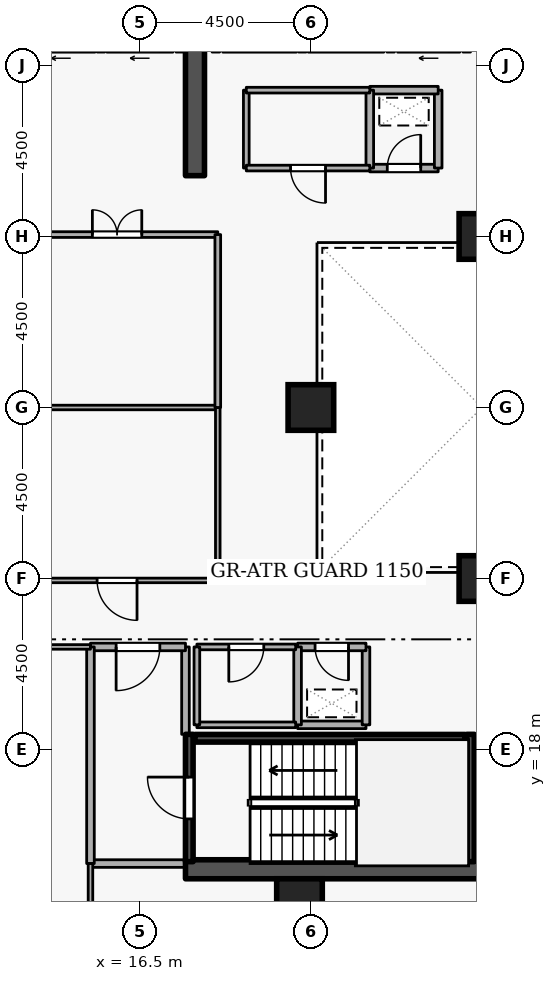
"""IFC4 building model, lengths in metres.
Left out: names, types, materials, properties, quantities, classifications, styles, units other than length and angle.
Written with IfcOpenShell. Run it as: python <this file> out.ifc"""

import sys

from ifc_helpers import new_model, si_unit, direction, frame, frame_2d, origin, origin_2d, place, context, subcontext, project, spatial, rectangle, extrude, element, fill, save


model = new_model("IFC4")
c1 = context("Model", 3, precision=1e-05, world=origin(), true_north=direction((0.0, 1.0)))
c2 = subcontext(c1, "Body", "Model", "MODEL_VIEW")
j1 = project(units=[si_unit("LENGTHUNIT", "METRE"), si_unit("PLANEANGLEUNIT", "RADIAN")], contexts=[c1])
p1 = place(None, origin())
s1 = spatial("IfcSite", under=j1, at=p1, CompositionType="ELEMENT")
p2 = place(p1, origin())
s2 = spatial("IfcBuilding", under=s1, at=p2, CompositionType="ELEMENT")
p3 = place(p2, frame((0.0, 0.0, 123.3)))
s3 = spatial("IfcBuildingStorey", under=s2, at=p3, CompositionType="ELEMENT", Elevation=123.3)
p4 = place(p3, frame((17.7, 14.85, 0.0), z_axis=(0.0, 0.0, 1.0), x_axis=(1.0, 0.0, 0.0)))
e1 = element("IfcWall", 1, at=p4, inside=s3, PredefinedType="SHEAR", context=c2, shape_type="SweptSolid", body=[
    extrude(rectangle(XDim=15.6, YDim=0.5, at=frame_2d((7.8, 0.0))), origin(), (0.0, 0.0, 1.0), 3.6),
])
p5 = place(p3, frame((17.95, 33.1, 0.0), z_axis=(0.0, 0.0, 1.0), x_axis=(0.0, 1.0, 0.0)))
e2 = element("IfcWall", 2, at=p5, inside=s3, PredefinedType="SHEAR", context=c2, shape_type="SweptSolid", body=[
    extrude(rectangle(XDim=5.8, YDim=0.5, at=frame_2d((2.9, 0.0))), origin(), (0.0, 0.0, 1.0), 3.6),
])
for number, where, z_axis, x_axis in (
    (3, (20.7, 14.0, 0.0), (0.0, 0.0, 1.0), (1.0, 0.0, 0.0)),
    (4, (25.5, 22.5, 0.0), (0.0, 0.0, 1.0), (1.0, 0.0, 0.0)),
    (5, (25.5, 31.5, 0.0), (0.0, 0.0, 1.0), (1.0, 0.0, 0.0)),
    (6, (21.0, 27.0, 0.0), (0.0, 0.0, 1.0), (1.0, 0.0, 0.0)),
):
    element("IfcColumn", number, at=place(p3, frame(where, z_axis=z_axis, x_axis=x_axis)), inside=s3, PredefinedType="COLUMN", context=c2, shape_type="SweptSolid", body=[
        extrude(rectangle(XDim=1.2, YDim=1.2, at=origin_2d()), origin(), (0.0, 0.0, 1.0), 3.6),
    ])
p6 = place(p3, frame((24.92, 36.45, 0.0), z_axis=(0.0, 0.0, 1.0), x_axis=(-1.0, 0.0, 0.0)))
e7 = element("IfcWall", 7, at=p6, inside=s3, PredefinedType="STANDARD", context=c2, shape_type="SweptSolid", body=[
    extrude(rectangle(XDim=1.64, YDim=0.2, at=frame_2d((0.82, 0.0))), origin(), (0.0, 0.0, 1.0), 3.34),
])
p7 = place(p6, frame((0.31, 0.0, 0.0)))
e8 = element("IfcOpeningElement", 8, at=p7, cuts=e7, PredefinedType="OPENING", context=c2, shape_type="SweptSolid", body=[
    extrude(rectangle(XDim=1.02, YDim=2.06, at=frame_2d((0.51, 1.03))), frame((0.0, 0.11, 0.0), z_axis=(0.0, -1.0, 0.0), x_axis=(1.0, 0.0, 0.0)), (0.0, 0.0, 1.0), 0.22),
])
p8 = place(p3, frame((22.92, 36.45, 0.0), z_axis=(0.0, 0.0, 1.0), x_axis=(-1.0, 0.0, 0.0)))
e9 = element("IfcWall", 9, at=p8, inside=s3, PredefinedType="STANDARD", context=c2, shape_type="SweptSolid", body=[
    extrude(rectangle(XDim=1.99, YDim=0.2, at=frame_2d((0.995, 0.0))), origin(), (0.0, 0.0, 1.0), 3.34),
])
p9 = place(p3, frame((20.62, 36.45, 0.0), z_axis=(0.0, 0.0, 1.0), x_axis=(-1.0, 0.0, 0.0)))
e10 = element("IfcWall", 10, at=p9, inside=s3, PredefinedType="STANDARD", context=c2, shape_type="SweptSolid", body=[
    extrude(rectangle(XDim=1.94, YDim=0.2, at=frame_2d((0.97, 0.0))), origin(), (0.0, 0.0, 1.0), 3.34),
])
p10 = place(p3, frame((17.37, 36.45, 0.0), z_axis=(0.0, 0.0, 1.0), x_axis=(-1.0, 0.0, 0.0)))
e11 = element("IfcWall", 11, at=p10, inside=s3, PredefinedType="STANDARD", context=c2, shape_type="SweptSolid", body=[
    extrude(rectangle(XDim=1.74, YDim=0.2, at=frame_2d((0.87, 0.0))), origin(), (0.0, 0.0, 1.0), 3.34),
])
p11 = place(p10, frame((0.36, 0.0, 0.0)))
e12 = element("IfcOpeningElement", 12, at=p11, cuts=e11, PredefinedType="OPENING", context=c2, shape_type="SweptSolid", body=[
    extrude(rectangle(XDim=1.02, YDim=2.06, at=frame_2d((0.51, 1.03))), frame((0.0, 0.11, 0.0), z_axis=(0.0, -1.0, 0.0), x_axis=(1.0, 0.0, 0.0)), (0.0, 0.0, 1.0), 0.22),
])
p12 = place(p3, frame((15.32, 36.45, 0.0), z_axis=(0.0, 0.0, 1.0), x_axis=(-1.0, 0.0, 0.0)))
e13 = element("IfcWall", 13, at=p12, inside=s3, PredefinedType="STANDARD", context=c2, shape_type="SweptSolid", body=[
    extrude(rectangle(XDim=1.79, YDim=0.2, at=frame_2d((0.895, 0.0))), origin(), (0.0, 0.0, 1.0), 3.34),
])
p13 = place(p12, frame((0.385, 0.0, 0.0)))
e14 = element("IfcOpeningElement", 14, at=p13, cuts=e13, PredefinedType="OPENING", context=c2, shape_type="SweptSolid", body=[
    extrude(rectangle(XDim=1.02, YDim=2.06, at=frame_2d((0.51, 1.03))), frame((0.0, 0.11, 0.0), z_axis=(0.0, -1.0, 0.0), x_axis=(1.0, 0.0, 0.0)), (0.0, 0.0, 1.0), 0.22),
])
p14 = place(p3, frame((17.8, 15.05, 0.0), z_axis=(0.0, 0.0, 1.0), x_axis=(0.0, 1.0, 0.0)))
e15 = element("IfcWall", 15, at=p14, inside=s3, PredefinedType="SHEAR", context=c2, shape_type="SweptSolid", body=[
    extrude(rectangle(XDim=3.35, YDim=0.2, at=frame_2d((1.675, 0.0))), origin(), (0.0, 0.0, 1.0), 3.6),
])
p15 = place(p14, frame((1.125, 0.0, 0.0)))
e16 = element("IfcOpeningElement", 16, at=p15, cuts=e15, PredefinedType="OPENING", context=c2, shape_type="SweptSolid", body=[
    extrude(rectangle(XDim=1.1, YDim=2.1, at=frame_2d((0.55, 1.05))), frame((0.0, 0.11, 0.0), z_axis=(0.0, -1.0, 0.0), x_axis=(1.0, 0.0, 0.0)), (0.0, 0.0, 1.0), 0.22),
])
p16 = place(p3, frame((25.2, 18.4, 0.0), z_axis=(0.0, 0.0, 1.0), x_axis=(0.0, -1.0, 0.0)))
e17 = element("IfcWall", 17, at=p16, inside=s3, PredefinedType="SHEAR", context=c2, shape_type="SweptSolid", body=[
    extrude(rectangle(XDim=3.35, YDim=0.2, at=frame_2d((1.675, 0.0))), origin(), (0.0, 0.0, 1.0), 3.6),
])
p17 = place(p3, frame((25.05, 18.297, 0.0), z_axis=(0.0, 0.0, 1.0), x_axis=(-1.0, 0.0, 0.0)))
e18 = element("IfcWall", 18, at=p17, inside=s3, PredefinedType="SHEAR", context=c2, shape_type="SweptSolid", body=[
    extrude(rectangle(XDim=7.1, YDim=0.2, at=frame_2d((3.55, 0.0))), origin(), (0.0, 0.0, 1.0), 3.6),
])
p18 = place(p3, frame((15.2, 15.0, 0.0), z_axis=(0.0, 0.0, 1.0), x_axis=(1.0, 0.0, 0.0)))
e19 = element("IfcWall", 19, at=p18, inside=s3, PredefinedType="STANDARD", context=c2, shape_type="SweptSolid", body=[
    extrude(rectangle(XDim=2.5, YDim=0.2, at=frame_2d((1.25, 0.0))), origin(), (0.0, 0.0, 1.0), 3.34),
])
p19 = place(p3, frame((17.7, 18.4, 0.0), z_axis=(0.0, 0.0, 1.0), x_axis=(0.0, 1.0, 0.0)))
e20 = element("IfcWall", 20, at=p19, inside=s3, PredefinedType="STANDARD", context=c2, shape_type="SweptSolid", body=[
    extrude(rectangle(XDim=2.3, YDim=0.2, at=frame_2d((1.15, 0.0))), origin(), (0.0, 0.0, 1.0), 2.545),
])
p20 = place(p3, frame((17.7, 20.7, 0.0), z_axis=(0.0, 0.0, 1.0), x_axis=(-1.0, 0.0, 0.0)))
e21 = element("IfcWall", 21, at=p20, inside=s3, PredefinedType="STANDARD", context=c2, shape_type="SweptSolid", body=[
    extrude(rectangle(XDim=2.5, YDim=0.2, at=frame_2d((1.25, 0.0))), origin(), (0.0, 0.0, 1.0), 3.34),
])
p21 = place(p20, frame((0.675, 0.0, 0.0)))
e22 = element("IfcOpeningElement", 22, at=p21, cuts=e21, PredefinedType="OPENING", context=c2, shape_type="SweptSolid", body=[
    extrude(rectangle(XDim=1.15, YDim=2.1, at=frame_2d((0.575, 1.05))), frame((0.0, 0.11, 0.0), z_axis=(0.0, -1.0, 0.0), x_axis=(1.0, 0.0, 0.0)), (0.0, 0.0, 1.0), 0.22),
])
p22 = place(p3, frame((15.2, 20.7, 0.0), z_axis=(0.0, 0.0, 1.0), x_axis=(0.0, -1.0, 0.0)))
e23 = element("IfcWall", 23, at=p22, inside=s3, PredefinedType="STANDARD", context=c2, shape_type="SweptSolid", body=[
    extrude(rectangle(XDim=5.7, YDim=0.2, at=frame_2d((2.85, 0.0))), origin(), (0.0, 0.0, 1.0), 3.34),
])
p23 = place(p3, frame((20.65, 18.65, 0.0), z_axis=(0.0, 0.0, 1.0), x_axis=(1.0, 0.0, 0.0)))
e24 = element("IfcWall", 24, at=p23, inside=s3, PredefinedType="STANDARD", context=c2, shape_type="SweptSolid", body=[
    extrude(rectangle(XDim=1.8, YDim=0.2, at=frame_2d((0.9, 0.0))), origin(), (0.0, 0.0, 1.0), 3.34),
])
p24 = place(p3, frame((22.45, 18.65, 0.0), z_axis=(0.0, 0.0, 1.0), x_axis=(0.0, 1.0, 0.0)))
e25 = element("IfcWall", 25, at=p24, inside=s3, PredefinedType="STANDARD", context=c2, shape_type="SweptSolid", body=[
    extrude(rectangle(XDim=2.05, YDim=0.2, at=frame_2d((1.025, 0.0))), origin(), (0.0, 0.0, 1.0), 3.34),
])
p25 = place(p3, frame((22.45, 20.7, 0.0), z_axis=(0.0, 0.0, 1.0), x_axis=(-1.0, 0.0, 0.0)))
e26 = element("IfcWall", 26, at=p25, inside=s3, PredefinedType="STANDARD", context=c2, shape_type="SweptSolid", body=[
    extrude(rectangle(XDim=1.8, YDim=0.2, at=frame_2d((0.9, 0.0))), origin(), (0.0, 0.0, 1.0), 3.34),
])
p26 = place(p25, frame((0.46, 0.0, 0.0)))
e27 = element("IfcOpeningElement", 27, at=p26, cuts=e26, PredefinedType="OPENING", context=c2, shape_type="SweptSolid", body=[
    extrude(rectangle(XDim=0.88, YDim=2.04, at=frame_2d((0.44, 1.02))), frame((0.0, 0.11, 0.0), z_axis=(0.0, -1.0, 0.0), x_axis=(1.0, 0.0, 0.0)), (0.0, 0.0, 1.0), 0.22),
])
p27 = place(p3, frame((20.65, 20.7, 0.0), z_axis=(0.0, 0.0, 1.0), x_axis=(0.0, -1.0, 0.0)))
e28 = element("IfcWall", 28, at=p27, inside=s3, PredefinedType="STANDARD", context=c2, shape_type="SweptSolid", body=[
    extrude(rectangle(XDim=2.05, YDim=0.2, at=frame_2d((1.025, 0.0))), origin(), (0.0, 0.0, 1.0), 3.34),
])
p28 = place(p3, frame((22.55, 33.3, 0.0), z_axis=(0.0, 0.0, 1.0), x_axis=(1.0, 0.0, 0.0)))
e29 = element("IfcWall", 29, at=p28, inside=s3, PredefinedType="STANDARD", context=c2, shape_type="SweptSolid", body=[
    extrude(rectangle(XDim=1.8, YDim=0.2, at=frame_2d((0.9, 0.0))), origin(), (0.0, 0.0, 1.0), 3.34),
])
p29 = place(p28, frame((0.46, 0.0, 0.0)))
e30 = element("IfcOpeningElement", 30, at=p29, cuts=e29, PredefinedType="OPENING", context=c2, shape_type="SweptSolid", body=[
    extrude(rectangle(XDim=0.88, YDim=2.04, at=frame_2d((0.44, 1.02))), frame((0.0, 0.11, 0.0), z_axis=(0.0, -1.0, 0.0), x_axis=(1.0, 0.0, 0.0)), (0.0, 0.0, 1.0), 0.22),
])
p30 = place(p3, frame((24.35, 33.3, 0.0), z_axis=(0.0, 0.0, 1.0), x_axis=(0.0, 1.0, 0.0)))
e31 = element("IfcWall", 31, at=p30, inside=s3, PredefinedType="STANDARD", context=c2, shape_type="SweptSolid", body=[
    extrude(rectangle(XDim=2.05, YDim=0.2, at=frame_2d((1.025, 0.0))), origin(), (0.0, 0.0, 1.0), 3.34),
])
p31 = place(p3, frame((24.35, 35.35, 0.0), z_axis=(0.0, 0.0, 1.0), x_axis=(-1.0, 0.0, 0.0)))
e32 = element("IfcWall", 32, at=p31, inside=s3, PredefinedType="STANDARD", context=c2, shape_type="SweptSolid", body=[
    extrude(rectangle(XDim=1.8, YDim=0.2, at=frame_2d((0.9, 0.0))), origin(), (0.0, 0.0, 1.0), 3.34),
])
p32 = place(p3, frame((22.55, 35.35, 0.0), z_axis=(0.0, 0.0, 1.0), x_axis=(0.0, -1.0, 0.0)))
e33 = element("IfcWall", 33, at=p32, inside=s3, PredefinedType="STANDARD", context=c2, shape_type="SweptSolid", body=[
    extrude(rectangle(XDim=2.05, YDim=0.2, at=frame_2d((1.025, 0.0))), origin(), (0.0, 0.0, 1.0), 3.34),
])
p33 = place(p3, frame((18.0, 18.65, 0.0), z_axis=(0.0, 0.0, 1.0), x_axis=(1.0, 0.0, 0.0)))
e34 = element("IfcWall", 34, at=p33, inside=s3, PredefinedType="PARTITIONING", context=c2, shape_type="SweptSolid", body=[
    extrude(rectangle(XDim=2.6, YDim=0.15, at=frame_2d((1.3, 0.0))), origin(), (0.0, 0.0, 1.0), 3.34),
])
p34 = place(p3, frame((20.6, 20.7, 0.0), z_axis=(0.0, 0.0, 1.0), x_axis=(-1.0, 0.0, 0.0)))
e35 = element("IfcWall", 35, at=p34, inside=s3, PredefinedType="PARTITIONING", context=c2, shape_type="SweptSolid", body=[
    extrude(rectangle(XDim=2.6, YDim=0.15, at=frame_2d((1.3, 0.0))), origin(), (0.0, 0.0, 1.0), 3.34),
])
p35 = place(p34, frame((0.84, 0.0, 0.0)))
e36 = element("IfcOpeningElement", 36, at=p35, cuts=e35, PredefinedType="OPENING", context=c2, shape_type="SweptSolid", body=[
    extrude(rectangle(XDim=0.92, YDim=2.08, at=frame_2d((0.46, 1.04))), frame((0.0, 0.085, 0.0), z_axis=(0.0, -1.0, 0.0), x_axis=(1.0, 0.0, 0.0)), (0.0, 0.0, 1.0), 0.17),
])
p36 = place(p3, frame((18.0, 20.7, 0.0), z_axis=(0.0, 0.0, 1.0), x_axis=(0.0, -1.0, 0.0)))
e37 = element("IfcWall", 37, at=p36, inside=s3, PredefinedType="PARTITIONING", context=c2, shape_type="SweptSolid", body=[
    extrude(rectangle(XDim=2.05, YDim=0.15, at=frame_2d((1.025, 0.0))), origin(), (0.0, 0.0, 1.0), 2.545),
])
p37 = place(p3, frame((19.3, 33.3, 0.0), z_axis=(0.0, 0.0, 1.0), x_axis=(0.0, 1.0, 0.0)))
e38 = element("IfcWall", 38, at=p37, inside=s3, PredefinedType="PARTITIONING", context=c2, shape_type="SweptSolid", body=[
    extrude(rectangle(XDim=2.05, YDim=0.15, at=frame_2d((1.025, 0.0))), origin(), (0.0, 0.0, 1.0), 3.34),
])
p38 = place(p3, frame((19.3, 35.35, 0.0), z_axis=(0.0, 0.0, 1.0), x_axis=(1.0, 0.0, 0.0)))
e39 = element("IfcWall", 39, at=p38, inside=s3, PredefinedType="PARTITIONING", context=c2, shape_type="SweptSolid", body=[
    extrude(rectangle(XDim=3.25, YDim=0.15, at=frame_2d((1.625, 0.0))), origin(), (0.0, 0.0, 1.0), 3.34),
])
p39 = place(p3, frame((22.55, 33.3, 0.0), z_axis=(0.0, 0.0, 1.0), x_axis=(-1.0, 0.0, 0.0)))
e40 = element("IfcWall", 40, at=p39, inside=s3, PredefinedType="PARTITIONING", context=c2, shape_type="SweptSolid", body=[
    extrude(rectangle(XDim=3.25, YDim=0.15, at=frame_2d((1.625, 0.0))), origin(), (0.0, 0.0, 1.0), 3.34),
])
p40 = place(p39, frame((1.165, 0.0, 0.0)))
e41 = element("IfcOpeningElement", 41, at=p40, cuts=e40, PredefinedType="OPENING", context=c2, shape_type="SweptSolid", body=[
    extrude(rectangle(XDim=0.92, YDim=2.08, at=frame_2d((0.46, 1.04))), frame((0.0, 0.085, 0.0), z_axis=(0.0, -1.0, 0.0), x_axis=(1.0, 0.0, 0.0)), (0.0, 0.0, 1.0), 0.17),
])
p41 = place(p3, frame((18.55, 22.45, 0.0), z_axis=(0.0, 0.0, 1.0), x_axis=(-1.0, 0.0, 0.0)))
e42 = element("IfcWall", 42, at=p41, inside=s3, PredefinedType="PARTITIONING", context=c2, shape_type="SweptSolid", body=[
    extrude(rectangle(XDim=5.3, YDim=0.12, at=frame_2d((2.65, 0.0))), origin(), (0.0, 0.0, 1.0), 3.34),
])
p42 = place(p41, frame((2.125, 0.0, 0.0)))
e43 = element("IfcOpeningElement", 43, at=p42, cuts=e42, PredefinedType="OPENING", context=c2, shape_type="SweptSolid", body=[
    extrude(rectangle(XDim=1.05, YDim=2.1, at=frame_2d((0.525, 1.05))), frame((0.0, 0.07, 0.0), z_axis=(0.0, -1.0, 0.0), x_axis=(1.0, 0.0, 0.0)), (0.0, 0.0, 1.0), 0.14),
])
p43 = place(p3, frame((13.25, 20.7, 0.0), z_axis=(0.0, 0.0, 1.0), x_axis=(1.0, 0.0, 0.0)))
e44 = element("IfcWall", 44, at=p43, inside=s3, PredefinedType="PARTITIONING", context=c2, shape_type="SweptSolid", body=[
    extrude(rectangle(XDim=1.95, YDim=0.12, at=frame_2d((0.975, 0.0))), origin(), (0.0, 0.0, 1.0), 3.34),
])
p44 = place(p3, frame((15.2, 15.0, 0.0), z_axis=(0.0, 0.0, 1.0), x_axis=(0.0, -1.0, 0.0)))
e45 = element("IfcWall", 45, at=p44, inside=s3, PredefinedType="PARTITIONING", context=c2, shape_type="SweptSolid", body=[
    extrude(rectangle(XDim=11.72, YDim=0.12, at=frame_2d((5.86, 0.0))), origin(), (0.0, 0.0, 1.0), 3.34),
])
p45 = place(p3, frame((1.78, 27.0, 0.0), z_axis=(0.0, 0.0, 1.0), x_axis=(1.0, 0.0, 0.0)))
e46 = element("IfcWall", 46, at=p45, inside=s3, PredefinedType="PARTITIONING", context=c2, shape_type="SweptSolid", body=[
    extrude(rectangle(XDim=16.77, YDim=0.12, at=frame_2d((8.385, 0.0))), origin(), (0.0, 0.0, 1.0), 2.932),
])
p46 = place(p3, frame((18.55, 27.0, 0.0), z_axis=(0.0, 0.0, 1.0), x_axis=(0.0, -1.0, 0.0)))
e47 = element("IfcWall", 47, at=p46, inside=s3, PredefinedType="PARTITIONING", context=c2, shape_type="SweptSolid", body=[
    extrude(rectangle(XDim=4.55, YDim=0.12, at=frame_2d((2.275, 0.0))), origin(), (0.0, 0.0, 1.0), 3.34),
])
p47 = place(p3, frame((13.25, 31.55, 0.0), z_axis=(0.0, 0.0, 1.0), x_axis=(1.0, 0.0, 0.0)))
e48 = element("IfcWall", 48, at=p47, inside=s3, PredefinedType="PARTITIONING", context=c2, shape_type="SweptSolid", body=[
    extrude(rectangle(XDim=5.3, YDim=0.15, at=frame_2d((2.65, 0.0))), origin(), (0.0, 0.0, 1.0), 3.34),
])
p48 = place(p47, frame((2.0, 0.0, 0.0)))
e49 = element("IfcOpeningElement", 49, at=p48, cuts=e48, PredefinedType="OPENING", context=c2, shape_type="SweptSolid", body=[
    extrude(rectangle(XDim=1.3, YDim=2.12, at=frame_2d((0.65, 1.06))), frame((0.0, 0.085, 0.0), z_axis=(0.0, -1.0, 0.0), x_axis=(1.0, 0.0, 0.0)), (0.0, 0.0, 1.0), 0.17),
])
p49 = place(p3, frame((18.55, 31.55, 0.0), z_axis=(0.0, 0.0, 1.0), x_axis=(0.0, -1.0, 0.0)))
e50 = element("IfcWall", 50, at=p49, inside=s3, PredefinedType="PARTITIONING", context=c2, shape_type="SweptSolid", body=[
    extrude(rectangle(XDim=4.55, YDim=0.15, at=frame_2d((2.275, 0.0))), origin(), (0.0, 0.0, 1.0), 3.34),
])
p50 = place(p15, origin())
e51 = element("IfcDoor", 51, at=p50, inside=s3, OperationType="SINGLE_SWING_RIGHT", PredefinedType="DOOR", context=c2, shape_type="SweptSolid", body=[
    extrude(rectangle(XDim=1.1, YDim=2.1, at=frame_2d((0.55, 1.05))), frame((0.0, 0.025, 0.0), z_axis=(0.0, -1.0, 0.0), x_axis=(1.0, 0.0, 0.0)), (0.0, 0.0, 1.0), 0.05),
])
fill(e16, e51)
p51 = place(p21, origin())
e52 = element("IfcDoor", 52, at=p51, inside=s3, OperationType="SINGLE_SWING_RIGHT", PredefinedType="DOOR", context=c2, shape_type="SweptSolid", body=[
    extrude(rectangle(XDim=1.15, YDim=2.1, at=frame_2d((0.575, 1.05))), frame((0.0, 0.025, 0.0), z_axis=(0.0, -1.0, 0.0), x_axis=(1.0, 0.0, 0.0)), (0.0, 0.0, 1.0), 0.05),
])
fill(e22, e52)
p52 = place(p26, origin())
e53 = element("IfcDoor", 53, at=p52, inside=s3, OperationType="SINGLE_SWING_LEFT", PredefinedType="DOOR", context=c2, shape_type="SweptSolid", body=[
    extrude(rectangle(XDim=0.88, YDim=2.04, at=frame_2d((0.44, 1.02))), frame((0.0, 0.025, 0.0), z_axis=(0.0, -1.0, 0.0), x_axis=(1.0, 0.0, 0.0)), (0.0, 0.0, 1.0), 0.05),
])
fill(e27, e53)
p53 = place(p29, origin())
e54 = element("IfcDoor", 54, at=p53, inside=s3, OperationType="SINGLE_SWING_RIGHT", PredefinedType="DOOR", context=c2, shape_type="SweptSolid", body=[
    extrude(rectangle(XDim=0.88, YDim=2.04, at=frame_2d((0.44, 1.02))), frame((0.0, 0.025, 0.0), z_axis=(0.0, -1.0, 0.0), x_axis=(1.0, 0.0, 0.0)), (0.0, 0.0, 1.0), 0.05),
])
fill(e30, e54)
p54 = place(p35, origin())
e55 = element("IfcDoor", 55, at=p54, inside=s3, OperationType="SINGLE_SWING_RIGHT", PredefinedType="DOOR", context=c2, shape_type="SweptSolid", body=[
    extrude(rectangle(XDim=0.92, YDim=2.08, at=frame_2d((0.46, 1.04))), frame((0.0, 0.025, 0.0), z_axis=(0.0, -1.0, 0.0), x_axis=(1.0, 0.0, 0.0)), (0.0, 0.0, 1.0), 0.05),
])
fill(e36, e55)
p55 = place(p40, origin())
e56 = element("IfcDoor", 56, at=p55, inside=s3, OperationType="SINGLE_SWING_LEFT", PredefinedType="DOOR", context=c2, shape_type="SweptSolid", body=[
    extrude(rectangle(XDim=0.92, YDim=2.08, at=frame_2d((0.46, 1.04))), frame((0.0, 0.025, 0.0), z_axis=(0.0, -1.0, 0.0), x_axis=(1.0, 0.0, 0.0)), (0.0, 0.0, 1.0), 0.05),
])
fill(e41, e56)
p56 = place(p42, origin())
e57 = element("IfcDoor", 57, at=p56, inside=s3, OperationType="SINGLE_SWING_LEFT", PredefinedType="DOOR", context=c2, shape_type="SweptSolid", body=[
    extrude(rectangle(XDim=1.05, YDim=2.1, at=frame_2d((0.525, 1.05))), frame((0.0, 0.025, 0.0), z_axis=(0.0, -1.0, 0.0), x_axis=(1.0, 0.0, 0.0)), (0.0, 0.0, 1.0), 0.05),
])
fill(e43, e57)
p57 = place(p48, origin())
e58 = element("IfcDoor", 58, at=p57, inside=s3, OperationType="DOUBLE_DOOR_SINGLE_SWING", PredefinedType="DOOR", context=c2, shape_type="SweptSolid", body=[
    extrude(rectangle(XDim=1.3, YDim=2.12, at=frame_2d((0.65, 1.06))), frame((0.0, 0.025, 0.0), z_axis=(0.0, -1.0, 0.0), x_axis=(1.0, 0.0, 0.0)), (0.0, 0.0, 1.0), 0.05),
])
fill(e49, e58)
save(model, sys.argv[1])
